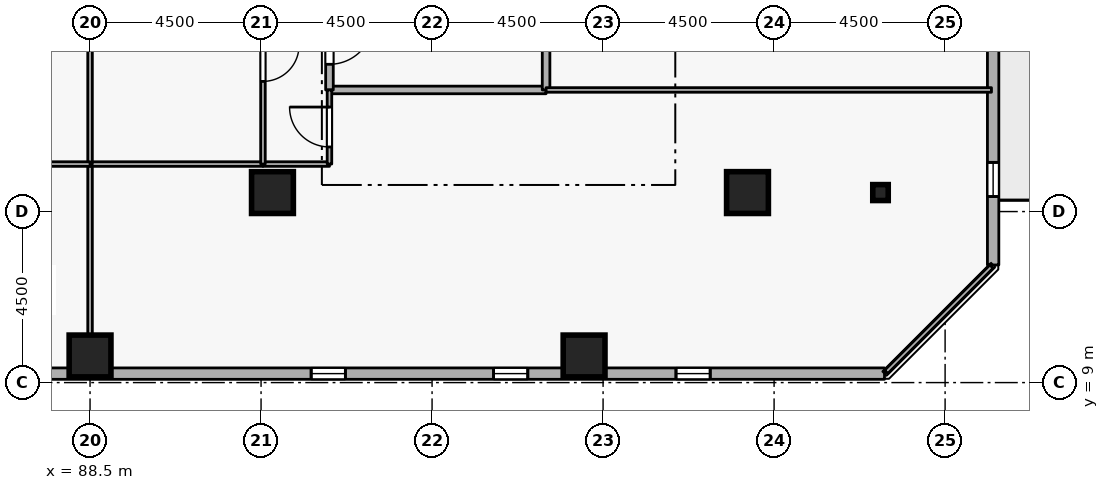
"""IFC4 building model, lengths in metres.
Left out: names, types, materials, properties, quantities, classifications, styles, units other than length and angle.
Written with IfcOpenShell. Run it as: python <this file> out.ifc"""

import sys

from ifc_helpers import new_model, si_unit, direction, frame, frame_2d, origin, origin_2d, place, context, subcontext, project, spatial, rectangle, i_section, extrude, element, fill, save


model = new_model("IFC4")
c1 = context("Model", 3, precision=1e-05, world=origin(), true_north=direction((0.0, 1.0)))
c2 = subcontext(c1, "Body", "Model", "MODEL_VIEW")
j1 = project(units=[si_unit("LENGTHUNIT", "METRE"), si_unit("PLANEANGLEUNIT", "RADIAN")], contexts=[c1])
p1 = place(None, origin())
s1 = spatial("IfcSite", under=j1, at=p1, CompositionType="ELEMENT")
p2 = place(p1, origin())
s2 = spatial("IfcBuilding", under=s1, at=p2, CompositionType="ELEMENT")
p3 = place(p2, frame((0.0, 0.0, 167.1)))
s3 = spatial("IfcBuildingStorey", under=s2, at=p3, CompositionType="ELEMENT", Elevation=167.1)
for number, where, z_axis, x_axis in (
    (1, (105.8, 14.0, 0.0), (0.0, 0.0, 1.0), (1.0, 0.0, 0.0)),
    (2, (101.5, 9.7, 0.0), (0.0, 0.0, 1.0), (1.0, 0.0, 0.0)),
    (3, (88.5, 9.7, 0.0), (0.0, 0.0, 1.0), (1.0, 0.0, 0.0)),
    (4, (93.3, 14.0, 0.0), (0.0, 0.0, 1.0), (1.0, 0.0, 0.0)),
):
    element("IfcColumn", number, at=place(p3, frame(where, z_axis=z_axis, x_axis=x_axis)), inside=s3, PredefinedType="COLUMN", context=c2, shape_type="SweptSolid", body=[
        extrude(rectangle(XDim=1.1, YDim=1.1, at=origin_2d()), origin(), (0.0, 0.0, 1.0), 3.6),
    ])
p4 = place(p3, frame((109.3, 14.0, 0.0), z_axis=(0.0, 0.0, 1.0), x_axis=(1.0, 0.0, 0.0)))
e5 = element("IfcColumn", 5, at=p4, inside=s3, PredefinedType="COLUMN", context=c2, shape_type="SweptSolid", body=[
    extrude(i_section(OverallWidth=0.407, OverallDepth=0.419, WebThickness=0.031, FlangeThickness=0.049, FilletRadius=0.015, at=origin_2d()), origin(), (0.0, 0.0, 1.0), 3.6),
])
p5 = place(p3, frame((73.319, 9.235, 0.0), z_axis=(0.0, 0.0, 1.0), x_axis=(0.999999999634, 2.7061402e-05, 0.0)))
e6 = element("IfcWall", 6, at=p5, inside=s3, PredefinedType="STANDARD", context=c2, shape_type="SweptSolid", body=[
    extrude(rectangle(XDim=36.087, YDim=0.3, at=frame_2d((18.043, 0.0))), origin(), (0.0, 0.0, 1.0), 2.7),
])
p6 = place(p5, frame((6.6, 0.0, 0.72)))
e7 = element("IfcOpeningElement", 7, at=p6, cuts=e6, PredefinedType="OPENING", context=c2, shape_type="SweptSolid", body=[
    extrude(rectangle(XDim=0.9, YDim=1.75, at=frame_2d((0.45, 0.875))), frame((0.0, 0.16, 0.0), z_axis=(0.0, -1.0, 0.0), x_axis=(1.0, 0.0, 0.0)), (0.0, 0.0, 1.0), 0.32),
])
p7 = place(p5, frame((11.4, 0.0, 0.72)))
e8 = element("IfcOpeningElement", 8, at=p7, cuts=e6, PredefinedType="OPENING", context=c2, shape_type="SweptSolid", body=[
    extrude(rectangle(XDim=0.9, YDim=1.75, at=frame_2d((0.45, 0.875))), frame((0.0, 0.16, 0.0), z_axis=(0.0, -1.0, 0.0), x_axis=(1.0, 0.0, 0.0)), (0.0, 0.0, 1.0), 0.32),
])
p8 = place(p5, frame((21.0, 0.0, 0.72)))
e9 = element("IfcOpeningElement", 9, at=p8, cuts=e6, PredefinedType="OPENING", context=c2, shape_type="SweptSolid", body=[
    extrude(rectangle(XDim=0.9, YDim=1.75, at=frame_2d((0.45, 0.875))), frame((0.0, 0.16, 0.0), z_axis=(0.0, -1.0, 0.0), x_axis=(1.0, 0.0, 0.0)), (0.0, 0.0, 1.0), 0.32),
])
p9 = place(p5, frame((25.8, 0.0, 0.72)))
e10 = element("IfcOpeningElement", 10, at=p9, cuts=e6, PredefinedType="OPENING", context=c2, shape_type="SweptSolid", body=[
    extrude(rectangle(XDim=0.9, YDim=1.75, at=frame_2d((0.45, 0.875))), frame((0.0, 0.16, 0.0), z_axis=(0.0, -1.0, 0.0), x_axis=(1.0, 0.0, 0.0)), (0.0, 0.0, 1.0), 0.32),
])
p10 = place(p5, frame((30.6, 0.0, 0.72)))
e11 = element("IfcOpeningElement", 11, at=p10, cuts=e6, PredefinedType="OPENING", context=c2, shape_type="SweptSolid", body=[
    extrude(rectangle(XDim=0.9, YDim=1.75, at=frame_2d((0.45, 0.875))), frame((0.0, 0.16, 0.0), z_axis=(0.0, -1.0, 0.0), x_axis=(1.0, 0.0, 0.0)), (0.0, 0.0, 1.0), 0.32),
])
p11 = place(p3, frame((112.264, 12.094, 0.0), z_axis=(0.0, 0.0, 1.0), x_axis=(2.7061402e-05, 0.999999999634, 0.0)))
e12 = element("IfcWall", 12, at=p11, inside=s3, PredefinedType="STANDARD", context=c2, shape_type="SweptSolid", body=[
    extrude(rectangle(XDim=36.087, YDim=0.3, at=frame_2d((18.043, 0.0))), origin(), (0.0, 0.0, 1.0), 2.7),
])
p12 = place(p11, frame((22.993, 0.0, 0.0)))
e13 = element("IfcOpeningElement", 13, at=p12, cuts=e12, PredefinedType="OPENING", context=c2, shape_type="SweptSolid", body=[
    extrude(rectangle(XDim=1.0, YDim=2.08, at=frame_2d((0.5, 1.04))), frame((0.0, 0.16, 0.0), z_axis=(0.0, -1.0, 0.0), x_axis=(1.0, 0.0, 0.0)), (0.0, 0.0, 1.0), 0.32),
])
p13 = place(p11, frame((1.8, 0.0, 0.72)))
e14 = element("IfcOpeningElement", 14, at=p13, cuts=e12, PredefinedType="OPENING", context=c2, shape_type="SweptSolid", body=[
    extrude(rectangle(XDim=0.9, YDim=1.75, at=frame_2d((0.45, 0.875))), frame((0.0, 0.16, 0.0), z_axis=(0.0, -1.0, 0.0), x_axis=(1.0, 0.0, 0.0)), (0.0, 0.0, 1.0), 0.32),
])
p14 = place(p11, frame((6.6, 0.0, 0.72)))
e15 = element("IfcOpeningElement", 15, at=p14, cuts=e12, PredefinedType="OPENING", context=c2, shape_type="SweptSolid", body=[
    extrude(rectangle(XDim=0.9, YDim=1.75, at=frame_2d((0.45, 0.875))), frame((0.0, 0.16, 0.0), z_axis=(0.0, -1.0, 0.0), x_axis=(1.0, 0.0, 0.0)), (0.0, 0.0, 1.0), 0.32),
])
p15 = place(p11, frame((11.4, 0.0, 0.72)))
e16 = element("IfcOpeningElement", 16, at=p15, cuts=e12, PredefinedType="OPENING", context=c2, shape_type="SweptSolid", body=[
    extrude(rectangle(XDim=0.9, YDim=1.75, at=frame_2d((0.45, 0.875))), frame((0.0, 0.16, 0.0), z_axis=(0.0, -1.0, 0.0), x_axis=(1.0, 0.0, 0.0)), (0.0, 0.0, 1.0), 0.32),
])
p16 = place(p11, frame((16.2, 0.0, 0.72)))
e17 = element("IfcOpeningElement", 17, at=p16, cuts=e12, PredefinedType="OPENING", context=c2, shape_type="SweptSolid", body=[
    extrude(rectangle(XDim=0.9, YDim=1.75, at=frame_2d((0.45, 0.875))), frame((0.0, 0.16, 0.0), z_axis=(0.0, -1.0, 0.0), x_axis=(1.0, 0.0, 0.0)), (0.0, 0.0, 1.0), 0.32),
])
p17 = place(p11, frame((21.0, 0.0, 0.72)))
e18 = element("IfcOpeningElement", 18, at=p17, cuts=e12, PredefinedType="OPENING", context=c2, shape_type="SweptSolid", body=[
    extrude(rectangle(XDim=0.9, YDim=1.75, at=frame_2d((0.45, 0.875))), frame((0.0, 0.16, 0.0), z_axis=(0.0, -1.0, 0.0), x_axis=(1.0, 0.0, 0.0)), (0.0, 0.0, 1.0), 0.32),
])
p18 = place(p11, frame((25.8, 0.0, 0.72)))
e19 = element("IfcOpeningElement", 19, at=p18, cuts=e12, PredefinedType="OPENING", context=c2, shape_type="SweptSolid", body=[
    extrude(rectangle(XDim=0.9, YDim=1.75, at=frame_2d((0.45, 0.875))), frame((0.0, 0.16, 0.0), z_axis=(0.0, -1.0, 0.0), x_axis=(1.0, 0.0, 0.0)), (0.0, 0.0, 1.0), 0.32),
])
p19 = place(p11, frame((30.6, 0.0, 0.72)))
e20 = element("IfcOpeningElement", 20, at=p19, cuts=e12, PredefinedType="OPENING", context=c2, shape_type="SweptSolid", body=[
    extrude(rectangle(XDim=0.9, YDim=1.75, at=frame_2d((0.45, 0.875))), frame((0.0, 0.16, 0.0), z_axis=(0.0, -1.0, 0.0), x_axis=(1.0, 0.0, 0.0)), (0.0, 0.0, 1.0), 0.32),
])
p20 = place(p3, frame((94.8, 16.7, 0.0), z_axis=(0.0, 0.0, 1.0), x_axis=(1.0, 0.0, 0.0)))
e21 = element("IfcWall", 21, at=p20, inside=s3, PredefinedType="STANDARD", context=c2, shape_type="SweptSolid", body=[
    extrude(rectangle(XDim=5.7, YDim=0.2, at=frame_2d((2.85, 0.0))), origin(), (0.0, 0.0, 1.0), 3.34),
])
p21 = place(p3, frame((100.5, 16.7, 0.0), z_axis=(0.0, 0.0, 1.0), x_axis=(0.0, 1.0, 0.0)))
e22 = element("IfcWall", 22, at=p21, inside=s3, PredefinedType="STANDARD", context=c2, shape_type="SweptSolid", body=[
    extrude(rectangle(XDim=2.5, YDim=0.2, at=frame_2d((1.25, 0.0))), origin(), (0.0, 0.0, 1.0), 3.34),
])
p22 = place(p3, frame((94.8, 19.2, 0.0), z_axis=(0.0, 0.0, 1.0), x_axis=(0.0, -1.0, 0.0)))
e23 = element("IfcWall", 23, at=p22, inside=s3, PredefinedType="STANDARD", context=c2, shape_type="SweptSolid", body=[
    extrude(rectangle(XDim=2.5, YDim=0.2, at=frame_2d((1.25, 0.0))), origin(), (0.0, 0.0, 1.0), 3.34),
])
p23 = place(p22, frame((0.675, 0.0, 0.0)))
e24 = element("IfcOpeningElement", 24, at=p23, cuts=e23, PredefinedType="OPENING", context=c2, shape_type="SweptSolid", body=[
    extrude(rectangle(XDim=1.15, YDim=2.1, at=frame_2d((0.575, 1.05))), frame((0.0, 0.11, 0.0), z_axis=(0.0, -1.0, 0.0), x_axis=(1.0, 0.0, 0.0)), (0.0, 0.0, 1.0), 0.22),
])
p24 = place(p3, frame((88.5, 9.28, 0.0), z_axis=(0.0, 0.0, 1.0), x_axis=(0.0, 1.0, 0.0)))
e25 = element("IfcWall", 25, at=p24, inside=s3, PredefinedType="PARTITIONING", context=c2, shape_type="SweptSolid", body=[
    extrude(rectangle(XDim=5.47, YDim=0.12, at=frame_2d((2.735, 0.0))), origin(), (0.0, 0.0, 1.0), 2.882),
])
p25 = place(p3, frame((88.5, 14.75, 0.0), z_axis=(0.0, 0.0, 1.0), x_axis=(1.0, 0.0, 0.0)))
e26 = element("IfcWall", 26, at=p25, inside=s3, PredefinedType="PARTITIONING", context=c2, shape_type="SweptSolid", body=[
    extrude(rectangle(XDim=4.55, YDim=0.12, at=frame_2d((2.275, 0.0))), origin(), (0.0, 0.0, 1.0), 3.34),
])
p26 = place(p3, frame((93.05, 14.75, 0.0), z_axis=(0.0, 0.0, 1.0), x_axis=(1.0, 0.0, 0.0)))
e27 = element("IfcWall", 27, at=p26, inside=s3, PredefinedType="PARTITIONING", context=c2, shape_type="SweptSolid", body=[
    extrude(rectangle(XDim=1.75, YDim=0.12, at=frame_2d((0.875, 0.0))), origin(), (0.0, 0.0, 1.0), 3.34),
])
p27 = place(p3, frame((94.8, 14.75, 0.0), z_axis=(0.0, 0.0, 1.0), x_axis=(0.0, 1.0, 0.0)))
e28 = element("IfcWall", 28, at=p27, inside=s3, PredefinedType="PARTITIONING", context=c2, shape_type="SweptSolid", body=[
    extrude(rectangle(XDim=1.95, YDim=0.12, at=frame_2d((0.975, 0.0))), origin(), (0.0, 0.0, 1.0), 3.34),
])
p28 = place(p27, frame((0.45, 0.0, 0.0)))
e29 = element("IfcOpeningElement", 29, at=p28, cuts=e28, PredefinedType="OPENING", context=c2, shape_type="SweptSolid", body=[
    extrude(rectangle(XDim=1.05, YDim=2.1, at=frame_2d((0.525, 1.05))), frame((0.0, 0.07, 0.0), z_axis=(0.0, -1.0, 0.0), x_axis=(1.0, 0.0, 0.0)), (0.0, 0.0, 1.0), 0.14),
])
p29 = place(p3, frame((100.5, 16.7, 0.0), z_axis=(0.0, 0.0, 1.0), x_axis=(1.0, 0.0, 0.0)))
e30 = element("IfcWall", 30, at=p29, inside=s3, PredefinedType="PARTITIONING", context=c2, shape_type="SweptSolid", body=[
    extrude(rectangle(XDim=11.72, YDim=0.12, at=frame_2d((5.86, 0.0))), origin(), (0.0, 0.0, 1.0), 3.34),
])
p30 = place(p3, frame((112.22, 12.052, 0.0), z_axis=(0.0, 0.0, 1.0), x_axis=(-0.707106781187, -0.707106781187, 0.0)))
e31 = element("IfcWall", 31, at=p30, inside=s3, PredefinedType="PARTITIONING", context=c2, shape_type="SweptSolid", body=[
    extrude(rectangle(XDim=3.919, YDim=0.12, at=frame_2d((1.96, 0.0))), origin(), (0.0, 0.0, 1.0), 3.34),
])
p31 = place(p3, frame((88.5, 14.75, 0.0), z_axis=(0.0, 0.0, 1.0), x_axis=(0.0, 1.0, 0.0)))
e32 = element("IfcWall", 32, at=p31, inside=s3, PredefinedType="PARTITIONING", context=c2, shape_type="SweptSolid", body=[
    extrude(rectangle(XDim=5.3, YDim=0.12, at=frame_2d((2.65, 0.0))), origin(), (0.0, 0.0, 1.0), 2.882),
])
p32 = place(p3, frame((93.05, 20.05, 0.0), z_axis=(0.0, 0.0, 1.0), x_axis=(0.0, -1.0, 0.0)))
e33 = element("IfcWall", 33, at=p32, inside=s3, PredefinedType="PARTITIONING", context=c2, shape_type="SweptSolid", body=[
    extrude(rectangle(XDim=5.3, YDim=0.12, at=frame_2d((2.65, 0.0))), origin(), (0.0, 0.0, 1.0), 3.34),
])
p33 = place(p32, frame((2.175, 0.0, 0.0)))
e34 = element("IfcOpeningElement", 34, at=p33, cuts=e33, PredefinedType="OPENING", context=c2, shape_type="SweptSolid", body=[
    extrude(rectangle(XDim=0.95, YDim=2.1, at=frame_2d((0.475, 1.05))), frame((0.0, 0.07, 0.0), z_axis=(0.0, -1.0, 0.0), x_axis=(1.0, 0.0, 0.0)), (0.0, 0.0, 1.0), 0.14),
])
p34 = place(p3, frame((88.5, 14.75, 0.0), z_axis=(0.0, 0.0, 1.0), x_axis=(-1.0, 0.0, 0.0)))
e35 = element("IfcWall", 35, at=p34, inside=s3, PredefinedType="PARTITIONING", context=c2, shape_type="SweptSolid", body=[
    extrude(rectangle(XDim=2.3, YDim=0.12, at=frame_2d((1.15, 0.0))), origin(), (0.0, 0.0, 1.0), 3.34),
])
p35 = place(p8, origin())
e36 = element("IfcWindow", 36, at=p35, inside=s3, PartitioningType="SINGLE_PANEL", PredefinedType="WINDOW", context=c2, shape_type="SweptSolid", body=[
    extrude(rectangle(XDim=0.9, YDim=1.75, at=frame_2d((0.45, 0.875))), frame((0.0, 0.03, 0.0), z_axis=(0.0, -1.0, 0.0), x_axis=(1.0, 0.0, 0.0)), (0.0, 0.0, 1.0), 0.06),
])
fill(e9, e36)
p36 = place(p9, origin())
e37 = element("IfcWindow", 37, at=p36, inside=s3, PartitioningType="SINGLE_PANEL", PredefinedType="WINDOW", context=c2, shape_type="SweptSolid", body=[
    extrude(rectangle(XDim=0.9, YDim=1.75, at=frame_2d((0.45, 0.875))), frame((0.0, 0.03, 0.0), z_axis=(0.0, -1.0, 0.0), x_axis=(1.0, 0.0, 0.0)), (0.0, 0.0, 1.0), 0.06),
])
fill(e10, e37)
p37 = place(p10, origin())
e38 = element("IfcWindow", 38, at=p37, inside=s3, PartitioningType="SINGLE_PANEL", PredefinedType="WINDOW", context=c2, shape_type="SweptSolid", body=[
    extrude(rectangle(XDim=0.9, YDim=1.75, at=frame_2d((0.45, 0.875))), frame((0.0, 0.03, 0.0), z_axis=(0.0, -1.0, 0.0), x_axis=(1.0, 0.0, 0.0)), (0.0, 0.0, 1.0), 0.06),
])
fill(e11, e38)
p38 = place(p13, origin())
e39 = element("IfcWindow", 39, at=p38, inside=s3, PartitioningType="SINGLE_PANEL", PredefinedType="WINDOW", context=c2, shape_type="SweptSolid", body=[
    extrude(rectangle(XDim=0.9, YDim=1.75, at=frame_2d((0.45, 0.875))), frame((0.0, 0.03, 0.0), z_axis=(0.0, -1.0, 0.0), x_axis=(1.0, 0.0, 0.0)), (0.0, 0.0, 1.0), 0.06),
])
fill(e14, e39)
p39 = place(p23, origin())
e40 = element("IfcDoor", 40, at=p39, inside=s3, OperationType="SINGLE_SWING_LEFT", PredefinedType="DOOR", context=c2, shape_type="SweptSolid", body=[
    extrude(rectangle(XDim=1.15, YDim=2.1, at=frame_2d((0.575, 1.05))), frame((0.0, 0.025, 0.0), z_axis=(0.0, -1.0, 0.0), x_axis=(1.0, 0.0, 0.0)), (0.0, 0.0, 1.0), 0.05),
])
fill(e24, e40)
p40 = place(p28, origin())
e41 = element("IfcDoor", 41, at=p40, inside=s3, OperationType="SINGLE_SWING_RIGHT", PredefinedType="DOOR", context=c2, shape_type="SweptSolid", body=[
    extrude(rectangle(XDim=1.05, YDim=2.1, at=frame_2d((0.525, 1.05))), frame((0.0, 0.025, 0.0), z_axis=(0.0, -1.0, 0.0), x_axis=(1.0, 0.0, 0.0)), (0.0, 0.0, 1.0), 0.05),
])
fill(e29, e41)
p41 = place(p33, origin())
e42 = element("IfcDoor", 42, at=p41, inside=s3, OperationType="SINGLE_SWING_LEFT", PredefinedType="DOOR", context=c2, shape_type="SweptSolid", body=[
    extrude(rectangle(XDim=0.95, YDim=2.1, at=frame_2d((0.475, 1.05))), frame((0.0, 0.025, 0.0), z_axis=(0.0, -1.0, 0.0), x_axis=(1.0, 0.0, 0.0)), (0.0, 0.0, 1.0), 0.05),
])
fill(e34, e42)
save(model, sys.argv[1])
